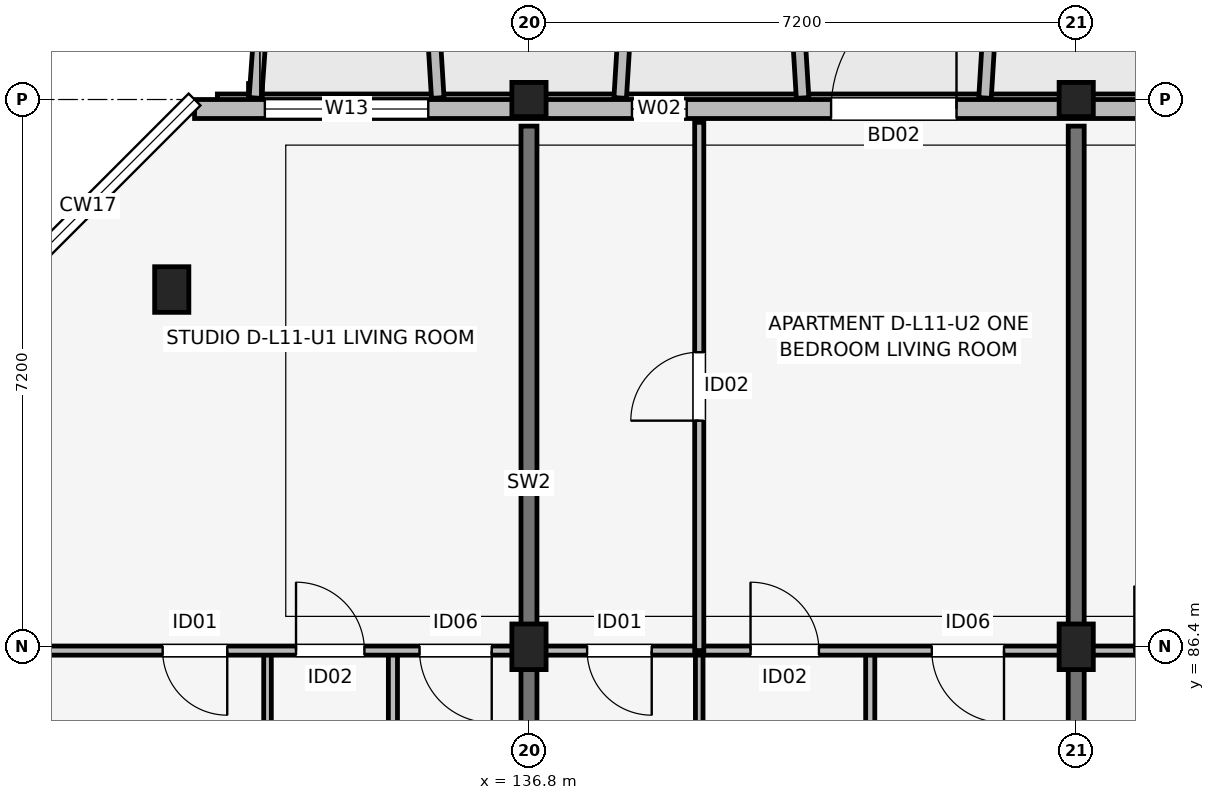
"""IFC4 building model, lengths in metres.
Left out: names, types, materials, properties, quantities, classifications, styles, units other than length and angle.
Written with IfcOpenShell. Run it as: python <this file> out.ifc"""

import sys

from ifc_helpers import new_model, si_unit, direction, frame, frame_2d, origin, origin_2d, place, context, subcontext, project, spatial, rectangle, extrude, element, fill, save


model = new_model("IFC4")
c1 = context("Model", 3, precision=1e-05, world=origin(), true_north=direction((0.0, 1.0)))
c2 = subcontext(c1, "Body", "Model", "MODEL_VIEW")
j1 = project(units=[si_unit("LENGTHUNIT", "METRE"), si_unit("PLANEANGLEUNIT", "RADIAN")], contexts=[c1])
p1 = place(None, origin())
s1 = spatial("IfcSite", under=j1, at=p1, CompositionType="ELEMENT")
p2 = place(p1, origin())
s2 = spatial("IfcBuilding", under=s1, at=p2, CompositionType="ELEMENT")
p3 = place(p2, frame((0.0, 0.0, 37.05)))
s3 = spatial("IfcBuildingStorey", under=s2, at=p3, CompositionType="ELEMENT", Elevation=37.05)
for number, where, z_axis, x_axis in (
    (1, (132.1, 91.1, 0.0), (0.0, 0.0, 1.0), (1.0, 0.0, 0.0)),
    (2, (136.8, 86.4, 0.0), (0.0, 0.0, 1.0), (1.0, 0.0, 0.0)),
):
    element("IfcColumn", number, at=place(p3, frame(where, z_axis=z_axis, x_axis=x_axis)), inside=s3, PredefinedType="COLUMN", context=c2, shape_type="SweptSolid", body=[
        extrude(rectangle(XDim=0.45, YDim=0.6, at=origin_2d()), origin(), (0.0, 0.0, 1.0), 3.15),
    ])
p4 = place(p3, frame((136.8, 93.6, 0.0), z_axis=(0.0, 0.0, 1.0), x_axis=(1.0, 0.0, 0.0)))
e3 = element("IfcColumn", 3, at=p4, inside=s3, PredefinedType="COLUMN", context=c2, shape_type="SweptSolid", body=[
    extrude(rectangle(XDim=0.45, YDim=0.45, at=origin_2d()), origin(), (0.0, 0.0, 1.0), 3.15),
])
p5 = place(p3, frame((144.0, 86.4, 0.0), z_axis=(0.0, 0.0, 1.0), x_axis=(1.0, 0.0, 0.0)))
e4 = element("IfcColumn", 4, at=p5, inside=s3, PredefinedType="COLUMN", context=c2, shape_type="SweptSolid", body=[
    extrude(rectangle(XDim=0.45, YDim=0.6, at=origin_2d()), origin(), (0.0, 0.0, 1.0), 3.15),
])
p6 = place(p3, frame((144.0, 93.6, 0.0), z_axis=(0.0, 0.0, 1.0), x_axis=(1.0, 0.0, 0.0)))
e5 = element("IfcColumn", 5, at=p6, inside=s3, PredefinedType="COLUMN", context=c2, shape_type="SweptSolid", body=[
    extrude(rectangle(XDim=0.45, YDim=0.45, at=origin_2d()), origin(), (0.0, 0.0, 1.0), 3.15),
])
for number, where, z_axis, x_axis in (
    (6, (136.8, 83.85, 0.0), (0.0, 0.0, 1.0), (0.0, 1.0, 0.0)),
    (7, (144.0, 83.85, 0.0), (0.0, 0.0, 1.0), (0.0, 1.0, 0.0)),
):
    element("IfcWall", number, at=place(p3, frame(where, z_axis=z_axis, x_axis=x_axis)), inside=s3, PredefinedType="SHEAR", context=c2, shape_type="SweptSolid", body=[
        extrude(rectangle(XDim=9.4, YDim=0.21, at=frame_2d((4.7, 0.0))), origin(), (0.0, 0.0, 1.0), 3.15),
    ])
p7 = place(p3, frame((162.8, 93.475, 0.0), z_axis=(0.0, 0.0, 1.0), x_axis=(-1.0, 0.0, 0.0)))
e8 = element("IfcWall", 8, at=p7, inside=s3, PredefinedType="SOLIDWALL", context=c2, shape_type="SweptSolid", body=[
    extrude(rectangle(XDim=30.4, YDim=0.25, at=frame_2d((15.2, 0.0))), origin(), (0.0, 0.0, 1.0), 2.45),
])
p8 = place(p7, frame((22.025, 0.0, 0.0), z_axis=(0.0, 0.0, 1.0), x_axis=(-1.0, 0.0, 0.0)))
e9 = element("IfcOpeningElement", 9, at=p8, cuts=e8, PredefinedType="OPENING", context=c2, shape_type="SweptSolid", body=[
    extrude(rectangle(XDim=1.65, YDim=2.15, at=frame_2d((0.825, 1.075))), frame((0.0, 0.135, 0.0), z_axis=(0.0, -1.0, 0.0), x_axis=(1.0, 0.0, 0.0)), (0.0, 0.0, 1.0), 0.27),
])
p9 = place(p7, frame((7.55, 0.0, 0.0), z_axis=(0.0, 0.0, 1.0), x_axis=(-1.0, 0.0, 0.0)))
e10 = element("IfcOpeningElement", 10, at=p9, cuts=e8, PredefinedType="OPENING", context=c2, shape_type="SweptSolid", body=[
    extrude(rectangle(XDim=1.5, YDim=2.15, at=frame_2d((0.75, 1.075))), frame((0.0, 0.135, 0.0), z_axis=(0.0, -1.0, 0.0), x_axis=(1.0, 0.0, 0.0)), (0.0, 0.0, 1.0), 0.27),
])
p10 = place(p7, frame((27.325, 0.0, 0.69)))
e11 = element("IfcOpeningElement", 11, at=p10, cuts=e8, PredefinedType="OPENING", context=c2, shape_type="SweptSolid", body=[
    extrude(rectangle(XDim=2.15, YDim=1.65, at=frame_2d((1.075, 0.825))), frame((0.0, 0.135, 0.0), z_axis=(0.0, -1.0, 0.0), x_axis=(1.0, 0.0, 0.0)), (0.0, 0.0, 1.0), 0.27),
])
p11 = place(p7, frame((23.925, 0.0, 0.75)))
e12 = element("IfcOpeningElement", 12, at=p11, cuts=e8, PredefinedType="OPENING", context=c2, shape_type="SweptSolid", body=[
    extrude(rectangle(XDim=0.72, YDim=1.35, at=frame_2d((0.36, 0.675))), frame((0.0, 0.135, 0.0), z_axis=(0.0, -1.0, 0.0), x_axis=(1.0, 0.0, 0.0)), (0.0, 0.0, 1.0), 0.27),
])
p12 = place(p7, frame((15.54, 0.0, 0.7)))
e13 = element("IfcOpeningElement", 13, at=p12, cuts=e8, PredefinedType="OPENING", context=c2, shape_type="SweptSolid", body=[
    extrude(rectangle(XDim=1.72, YDim=1.6, at=frame_2d((0.86, 0.8))), frame((0.0, 0.135, 0.0), z_axis=(0.0, -1.0, 0.0), x_axis=(1.0, 0.0, 0.0)), (0.0, 0.0, 1.0), 0.27),
])
p13 = place(p7, frame((3.367, 0.0, 0.75)))
e14 = element("IfcOpeningElement", 14, at=p13, cuts=e8, PredefinedType="OPENING", context=c2, shape_type="SweptSolid", body=[
    extrude(rectangle(XDim=0.6, YDim=1.25, at=frame_2d((0.3, 0.625))), frame((0.0, 0.135, 0.0), z_axis=(0.0, -1.0, 0.0), x_axis=(1.0, 0.0, 0.0)), (0.0, 0.0, 1.0), 0.27),
])
p14 = place(p7, frame((1.24, 0.0, 0.75)))
e15 = element("IfcOpeningElement", 15, at=p14, cuts=e8, PredefinedType="OPENING", context=c2, shape_type="SweptSolid", body=[
    extrude(rectangle(XDim=0.72, YDim=1.35, at=frame_2d((0.36, 0.675))), frame((0.0, 0.135, 0.0), z_axis=(0.0, -1.0, 0.0), x_axis=(1.0, 0.0, 0.0)), (0.0, 0.0, 1.0), 0.27),
])
p15 = place(p3, frame((133.2, 93.62, 0.0), z_axis=(0.0, 0.0, 1.0), x_axis=(0.071317687608, 0.997453651772, 0.0)))
e16 = element("IfcWall", 16, at=p15, inside=s3, PredefinedType="ELEMENTEDWALL", context=c2, shape_type="SweptSolid", body=[
    extrude(rectangle(XDim=1.965, YDim=0.165, at=frame_2d((0.982, 0.0))), origin(), (0.0, 0.0, 1.0), 2.95),
])
p16 = place(p3, frame((135.6, 93.62, 0.0), z_axis=(0.0, 0.0, 1.0), x_axis=(-0.061170732449, 0.998127317276, 0.0)))
e17 = element("IfcWall", 17, at=p16, inside=s3, PredefinedType="ELEMENTEDWALL", context=c2, shape_type="SweptSolid", body=[
    extrude(rectangle(XDim=1.964, YDim=0.165, at=frame_2d((0.982, 0.0))), origin(), (0.0, 0.0, 1.0), 2.95),
])
for number, where, z_axis, x_axis in (
    (18, (138.0, 93.62, 0.0), (0.0, 0.0, 1.0), (0.061, 0.998, 0.0)),
    (19, (140.4, 93.62, 0.0), (0.0, 0.0, 1.0), (-0.061, 0.998, 0.0)),
    (20, (142.8, 93.62, 0.0), (0.0, 0.0, 1.0), (0.061, 0.998, 0.0)),
):
    element("IfcWall", number, at=place(p3, frame(where, z_axis=z_axis, x_axis=x_axis)), inside=s3, PredefinedType="ELEMENTEDWALL", context=c2, shape_type="SweptSolid", body=[
        extrude(rectangle(XDim=1.964, YDim=0.165, at=frame_2d((0.982, 0.0))), origin(), (0.0, 0.0, 1.0), 2.55),
    ])
p17 = place(p3, frame((133.36, 83.7, 0.0), z_axis=(0.0, 0.0, 1.0), x_axis=(0.0, 1.0, 0.0)))
e21 = element("IfcWall", 21, at=p17, inside=s3, PredefinedType="PARTITIONING", context=c2, shape_type="SweptSolid", body=[
    extrude(rectangle(XDim=2.65, YDim=0.1, at=frame_2d((1.325, 0.0))), origin(), (0.0, 0.0, 1.0), 2.38),
])
p18 = place(p3, frame((135.01, 83.7, 0.0), z_axis=(0.0, 0.0, 1.0), x_axis=(0.0, 1.0, 0.0)))
e22 = element("IfcWall", 22, at=p18, inside=s3, PredefinedType="PARTITIONING", context=c2, shape_type="SweptSolid", body=[
    extrude(rectangle(XDim=2.65, YDim=0.12, at=frame_2d((1.325, 0.0))), origin(), (0.0, 0.0, 1.0), 2.38),
])
p19 = place(p3, frame((129.74, 86.35, 0.0), z_axis=(0.0, 0.0, 1.0), x_axis=(1.0, 0.0, 0.0)))
e23 = element("IfcWall", 23, at=p19, inside=s3, PredefinedType="PARTITIONING", context=c2, shape_type="SweptSolid", body=[
    extrude(rectangle(XDim=6.92, YDim=0.12, at=frame_2d((3.46, 0.0))), origin(), (0.0, 0.0, 1.0), 2.38),
])
p20 = place(p19, frame((3.09, 0.0, 0.0), z_axis=(0.0, 0.0, 1.0), x_axis=(-1.0, 0.0, 0.0)))
e24 = element("IfcOpeningElement", 24, at=p20, cuts=e23, PredefinedType="OPENING", context=c2, shape_type="SweptSolid", body=[
    extrude(rectangle(XDim=0.85, YDim=2.08, at=frame_2d((0.425, 1.04))), frame((0.0, 0.07, 0.0), z_axis=(0.0, -1.0, 0.0), x_axis=(1.0, 0.0, 0.0)), (0.0, 0.0, 1.0), 0.14),
])
p21 = place(p19, frame((3.995, 0.0, 0.0)))
e25 = element("IfcOpeningElement", 25, at=p21, cuts=e23, PredefinedType="OPENING", context=c2, shape_type="SweptSolid", body=[
    extrude(rectangle(XDim=0.9, YDim=2.08, at=frame_2d((0.45, 1.04))), frame((0.0, 0.07, 0.0), z_axis=(0.0, -1.0, 0.0), x_axis=(1.0, 0.0, 0.0)), (0.0, 0.0, 1.0), 0.14),
])
p22 = place(p19, frame((6.57, 0.0, 0.0), z_axis=(0.0, 0.0, 1.0), x_axis=(-1.0, 0.0, 0.0)))
e26 = element("IfcOpeningElement", 26, at=p22, cuts=e23, PredefinedType="OPENING", context=c2, shape_type="SweptSolid", body=[
    extrude(rectangle(XDim=0.95, YDim=2.08, at=frame_2d((0.475, 1.04))), frame((0.0, 0.07, 0.0), z_axis=(0.0, -1.0, 0.0), x_axis=(1.0, 0.0, 0.0)), (0.0, 0.0, 1.0), 0.14),
])
p23 = place(p3, frame((139.04, 83.7, 0.0), z_axis=(0.0, 0.0, 1.0), x_axis=(0.0, 1.0, 0.0)))
e27 = element("IfcWall", 27, at=p23, inside=s3, PredefinedType="PARTITIONING", context=c2, shape_type="SweptSolid", body=[
    extrude(rectangle(XDim=2.65, YDim=0.1, at=frame_2d((1.325, 0.0))), origin(), (0.0, 0.0, 1.0), 2.38),
])
p24 = place(p3, frame((141.29, 83.7, 0.0), z_axis=(0.0, 0.0, 1.0), x_axis=(0.0, 1.0, 0.0)))
e28 = element("IfcWall", 28, at=p24, inside=s3, PredefinedType="PARTITIONING", context=c2, shape_type="SweptSolid", body=[
    extrude(rectangle(XDim=2.65, YDim=0.12, at=frame_2d((1.325, 0.0))), origin(), (0.0, 0.0, 1.0), 2.38),
])
p25 = place(p3, frame((136.94, 86.35, 0.0), z_axis=(0.0, 0.0, 1.0), x_axis=(1.0, 0.0, 0.0)))
e29 = element("IfcWall", 29, at=p25, inside=s3, PredefinedType="PARTITIONING", context=c2, shape_type="SweptSolid", body=[
    extrude(rectangle(XDim=6.92, YDim=0.12, at=frame_2d((3.46, 0.0))), origin(), (0.0, 0.0, 1.0), 2.38),
])
p26 = place(p25, frame((1.475, 0.0, 0.0), z_axis=(0.0, 0.0, 1.0), x_axis=(-1.0, 0.0, 0.0)))
e30 = element("IfcOpeningElement", 30, at=p26, cuts=e29, PredefinedType="OPENING", context=c2, shape_type="SweptSolid", body=[
    extrude(rectangle(XDim=0.85, YDim=2.08, at=frame_2d((0.425, 1.04))), frame((0.0, 0.07, 0.0), z_axis=(0.0, -1.0, 0.0), x_axis=(1.0, 0.0, 0.0)), (0.0, 0.0, 1.0), 0.14),
])
p27 = place(p25, frame((2.775, 0.0, 0.0)))
e31 = element("IfcOpeningElement", 31, at=p27, cuts=e29, PredefinedType="OPENING", context=c2, shape_type="SweptSolid", body=[
    extrude(rectangle(XDim=0.9, YDim=2.08, at=frame_2d((0.45, 1.04))), frame((0.0, 0.07, 0.0), z_axis=(0.0, -1.0, 0.0), x_axis=(1.0, 0.0, 0.0)), (0.0, 0.0, 1.0), 0.14),
])
p28 = place(p25, frame((6.11, 0.0, 0.0), z_axis=(0.0, 0.0, 1.0), x_axis=(-1.0, 0.0, 0.0)))
e32 = element("IfcOpeningElement", 32, at=p28, cuts=e29, PredefinedType="OPENING", context=c2, shape_type="SweptSolid", body=[
    extrude(rectangle(XDim=0.95, YDim=2.08, at=frame_2d((0.475, 1.04))), frame((0.0, 0.07, 0.0), z_axis=(0.0, -1.0, 0.0), x_axis=(1.0, 0.0, 0.0)), (0.0, 0.0, 1.0), 0.14),
])
p29 = place(p3, frame((139.04, 86.35, 0.0), z_axis=(0.0, 0.0, 1.0), x_axis=(0.0, 1.0, 0.0)))
e33 = element("IfcWall", 33, at=p29, inside=s3, PredefinedType="PARTITIONING", context=c2, shape_type="SweptSolid", body=[
    extrude(rectangle(XDim=6.95, YDim=0.12, at=frame_2d((3.475, 0.0))), origin(), (0.0, 0.0, 1.0), 2.38),
])
p30 = place(p29, frame((3.025, 0.0, 0.0)))
e34 = element("IfcOpeningElement", 34, at=p30, cuts=e33, PredefinedType="OPENING", context=c2, shape_type="SweptSolid", body=[
    extrude(rectangle(XDim=0.9, YDim=2.08, at=frame_2d((0.45, 1.04))), frame((0.0, 0.07, 0.0), z_axis=(0.0, -1.0, 0.0), x_axis=(1.0, 0.0, 0.0)), (0.0, 0.0, 1.0), 0.14),
])
p31 = place(p3, frame((144.14, 86.35, 0.0), z_axis=(0.0, 0.0, 1.0), x_axis=(1.0, 0.0, 0.0)))
e35 = element("IfcWall", 35, at=p31, inside=s3, PredefinedType="PARTITIONING", context=c2, shape_type="SweptSolid", body=[
    extrude(rectangle(XDim=6.92, YDim=0.12, at=frame_2d((3.46, 0.0))), origin(), (0.0, 0.0, 1.0), 2.38),
])
p32 = place(p31, frame((0.625, 0.0, 0.0)))
e36 = element("IfcOpeningElement", 36, at=p32, cuts=e35, PredefinedType="OPENING", context=c2, shape_type="SweptSolid", body=[
    extrude(rectangle(XDim=0.85, YDim=2.08, at=frame_2d((0.425, 1.04))), frame((0.0, 0.07, 0.0), z_axis=(0.0, -1.0, 0.0), x_axis=(1.0, 0.0, 0.0)), (0.0, 0.0, 1.0), 0.14),
])
p33 = place(p31, frame((3.525, 0.0, 0.0), z_axis=(0.0, 0.0, 1.0), x_axis=(-1.0, 0.0, 0.0)))
e37 = element("IfcOpeningElement", 37, at=p33, cuts=e35, PredefinedType="OPENING", context=c2, shape_type="SweptSolid", body=[
    extrude(rectangle(XDim=0.9, YDim=2.08, at=frame_2d((0.45, 1.04))), frame((0.0, 0.07, 0.0), z_axis=(0.0, -1.0, 0.0), x_axis=(1.0, 0.0, 0.0)), (0.0, 0.0, 1.0), 0.14),
])
p34 = place(p31, frame((5.01, 0.0, 0.0)))
e38 = element("IfcOpeningElement", 38, at=p34, cuts=e35, PredefinedType="OPENING", context=c2, shape_type="SweptSolid", body=[
    extrude(rectangle(XDim=0.95, YDim=2.08, at=frame_2d((0.475, 1.04))), frame((0.0, 0.07, 0.0), z_axis=(0.0, -1.0, 0.0), x_axis=(1.0, 0.0, 0.0)), (0.0, 0.0, 1.0), 0.14),
])
p35 = place(p8, origin())
e39 = element("IfcDoor", 39, at=p35, inside=s3, OperationType="SINGLE_SWING_LEFT", PredefinedType="DOOR", context=c2, shape_type="SweptSolid", body=[
    extrude(rectangle(XDim=1.65, YDim=2.15, at=frame_2d((0.825, 1.075))), frame((0.0, 0.025, 0.0), z_axis=(0.0, -1.0, 0.0), x_axis=(1.0, 0.0, 0.0)), (0.0, 0.0, 1.0), 0.05),
])
fill(e9, e39)
p36 = place(p10, origin())
e40 = element("IfcWindow", 40, at=p36, inside=s3, PartitioningType="SINGLE_PANEL", PredefinedType="WINDOW", context=c2, shape_type="SweptSolid", body=[
    extrude(rectangle(XDim=2.15, YDim=1.65, at=frame_2d((1.075, 0.825))), frame((0.0, 0.03, 0.0), z_axis=(0.0, -1.0, 0.0), x_axis=(1.0, 0.0, 0.0)), (0.0, 0.0, 1.0), 0.06),
])
fill(e11, e40)
p37 = place(p11, origin())
e41 = element("IfcWindow", 41, at=p37, inside=s3, PartitioningType="SINGLE_PANEL", PredefinedType="WINDOW", context=c2, shape_type="SweptSolid", body=[
    extrude(rectangle(XDim=0.72, YDim=1.35, at=frame_2d((0.36, 0.675))), frame((0.0, 0.03, 0.0), z_axis=(0.0, -1.0, 0.0), x_axis=(1.0, 0.0, 0.0)), (0.0, 0.0, 1.0), 0.06),
])
fill(e12, e41)
p38 = place(p20, origin())
e42 = element("IfcDoor", 42, at=p38, inside=s3, OperationType="SINGLE_SWING_RIGHT", PredefinedType="DOOR", context=c2, shape_type="SweptSolid", body=[
    extrude(rectangle(XDim=0.85, YDim=2.08, at=frame_2d((0.425, 1.04))), frame((0.0, 0.025, 0.0), z_axis=(0.0, -1.0, 0.0), x_axis=(1.0, 0.0, 0.0)), (0.0, 0.0, 1.0), 0.05),
])
fill(e24, e42)
p39 = place(p21, origin())
e43 = element("IfcDoor", 43, at=p39, inside=s3, OperationType="SINGLE_SWING_LEFT", PredefinedType="DOOR", context=c2, shape_type="SweptSolid", body=[
    extrude(rectangle(XDim=0.9, YDim=2.08, at=frame_2d((0.45, 1.04))), frame((0.0, 0.025, 0.0), z_axis=(0.0, -1.0, 0.0), x_axis=(1.0, 0.0, 0.0)), (0.0, 0.0, 1.0), 0.05),
])
fill(e25, e43)
p40 = place(p22, origin())
e44 = element("IfcDoor", 44, at=p40, inside=s3, OperationType="SINGLE_SWING_RIGHT", PredefinedType="DOOR", context=c2, shape_type="SweptSolid", body=[
    extrude(rectangle(XDim=0.95, YDim=2.08, at=frame_2d((0.475, 1.04))), frame((0.0, 0.025, 0.0), z_axis=(0.0, -1.0, 0.0), x_axis=(1.0, 0.0, 0.0)), (0.0, 0.0, 1.0), 0.05),
])
fill(e26, e44)
p41 = place(p26, origin())
e45 = element("IfcDoor", 45, at=p41, inside=s3, OperationType="SINGLE_SWING_RIGHT", PredefinedType="DOOR", context=c2, shape_type="SweptSolid", body=[
    extrude(rectangle(XDim=0.85, YDim=2.08, at=frame_2d((0.425, 1.04))), frame((0.0, 0.025, 0.0), z_axis=(0.0, -1.0, 0.0), x_axis=(1.0, 0.0, 0.0)), (0.0, 0.0, 1.0), 0.05),
])
fill(e30, e45)
p42 = place(p27, origin())
e46 = element("IfcDoor", 46, at=p42, inside=s3, OperationType="SINGLE_SWING_LEFT", PredefinedType="DOOR", context=c2, shape_type="SweptSolid", body=[
    extrude(rectangle(XDim=0.9, YDim=2.08, at=frame_2d((0.45, 1.04))), frame((0.0, 0.025, 0.0), z_axis=(0.0, -1.0, 0.0), x_axis=(1.0, 0.0, 0.0)), (0.0, 0.0, 1.0), 0.05),
])
fill(e31, e46)
p43 = place(p28, origin())
e47 = element("IfcDoor", 47, at=p43, inside=s3, OperationType="SINGLE_SWING_RIGHT", PredefinedType="DOOR", context=c2, shape_type="SweptSolid", body=[
    extrude(rectangle(XDim=0.95, YDim=2.08, at=frame_2d((0.475, 1.04))), frame((0.0, 0.025, 0.0), z_axis=(0.0, -1.0, 0.0), x_axis=(1.0, 0.0, 0.0)), (0.0, 0.0, 1.0), 0.05),
])
fill(e32, e47)
p44 = place(p30, origin())
e48 = element("IfcDoor", 48, at=p44, inside=s3, OperationType="SINGLE_SWING_LEFT", PredefinedType="DOOR", context=c2, shape_type="SweptSolid", body=[
    extrude(rectangle(XDim=0.9, YDim=2.08, at=frame_2d((0.45, 1.04))), frame((0.0, 0.025, 0.0), z_axis=(0.0, -1.0, 0.0), x_axis=(1.0, 0.0, 0.0)), (0.0, 0.0, 1.0), 0.05),
])
fill(e34, e48)
p45 = place(p32, origin())
e49 = element("IfcDoor", 49, at=p45, inside=s3, OperationType="SINGLE_SWING_LEFT", PredefinedType="DOOR", context=c2, shape_type="SweptSolid", body=[
    extrude(rectangle(XDim=0.85, YDim=2.08, at=frame_2d((0.425, 1.04))), frame((0.0, 0.025, 0.0), z_axis=(0.0, -1.0, 0.0), x_axis=(1.0, 0.0, 0.0)), (0.0, 0.0, 1.0), 0.05),
])
fill(e36, e49)
save(model, sys.argv[1])
